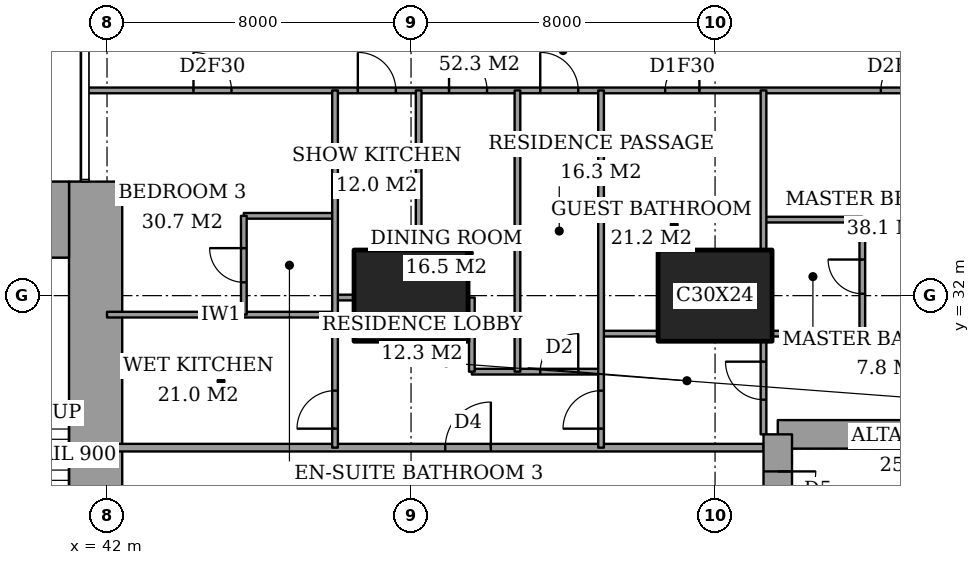
"""IFC4 building model, lengths in metres.
Left out: names, types, materials, properties, quantities, classifications, styles, units other than length and angle.
Written with IfcOpenShell. Run it as: python <this file> out.ifc"""

import sys

from ifc_helpers import new_model, si_unit, direction, frame, frame_2d, origin, origin_2d, place, context, subcontext, project, spatial, rectangle, extrude, element, fill, save


model = new_model("IFC4")
c1 = context("Model", 3, precision=1e-05, world=origin(), true_north=direction((0.0, 1.0)))
c2 = subcontext(c1, "Body", "Model", "MODEL_VIEW")
j1 = project(units=[si_unit("LENGTHUNIT", "METRE"), si_unit("PLANEANGLEUNIT", "RADIAN")], contexts=[c1])
p1 = place(None, origin())
s1 = spatial("IfcSite", under=j1, at=p1, CompositionType="ELEMENT")
p2 = place(p1, origin())
s2 = spatial("IfcBuilding", under=s1, at=p2, CompositionType="ELEMENT")
p3 = place(p2, frame((0.0, 0.0, 117.8)))
s3 = spatial("IfcBuildingStorey", under=s2, at=p3, CompositionType="ELEMENT", Elevation=117.8)
for number, where, z_axis, x_axis in (
    (1, (50.0, 32.0, 0.0), (0.0, 0.0, 1.0), (1.0, 0.0, 0.0)),
    (2, (58.0, 32.0, 0.0), (0.0, 0.0, 1.0), (1.0, 0.0, 0.0)),
):
    element("IfcColumn", number, at=place(p3, frame(where, z_axis=z_axis, x_axis=x_axis)), inside=s3, PredefinedType="COLUMN", context=c2, shape_type="SweptSolid", body=[
        extrude(rectangle(XDim=3.0, YDim=2.4, at=origin_2d()), origin(), (0.0, 0.0, 1.0), 3.6),
    ])
p4 = place(p3, frame((37.85, 34.0, 0.0), z_axis=(0.0, 0.0, 1.0), x_axis=(1.0, 0.0, 0.0)))
e3 = element("IfcWall", 3, at=p4, inside=s3, PredefinedType="SHEAR", context=c2, shape_type="SweptSolid", body=[
    extrude(rectangle(XDim=3.15, YDim=2.0, at=frame_2d((1.575, 0.0))), origin(), (0.0, 0.0, 1.0), 3.6),
])
p5 = place(p3, frame((41.7, 24.85, 0.0), z_axis=(0.0, 0.0, 1.0), x_axis=(0.0, 1.0, 0.0)))
e4 = element("IfcWall", 4, at=p5, inside=s3, PredefinedType="SHEAR", context=c2, shape_type="SweptSolid", body=[
    extrude(rectangle(XDim=10.15, YDim=1.4, at=frame_2d((5.075, 0.0))), origin(), (0.0, 0.0, 1.0), 3.6),
])
p6 = place(p3, frame((64.1, 28.35, 0.0), z_axis=(0.0, 0.0, 1.0), x_axis=(-1.0, 0.0, 0.0)))
e5 = element("IfcWall", 5, at=p6, inside=s3, PredefinedType="SHEAR", context=c2, shape_type="SweptSolid", body=[
    extrude(rectangle(XDim=4.45, YDim=0.75, at=frame_2d((2.225, 0.0))), origin(), (0.0, 0.0, 1.0), 3.6),
])
p7 = place(p3, frame((59.65, 28.35, 0.0), z_axis=(0.0, 0.0, 1.0), x_axis=(0.0, -1.0, 0.0)))
e6 = element("IfcWall", 6, at=p7, inside=s3, PredefinedType="SHEAR", context=c2, shape_type="SweptSolid", body=[
    extrude(rectangle(XDim=8.7, YDim=0.75, at=frame_2d((4.35, 0.0))), origin(), (0.0, 0.0, 1.0), 3.6),
])
p8 = place(p7, frame((0.975, 0.0, 0.0)))
e7 = element("IfcOpeningElement", 7, at=p8, cuts=e6, PredefinedType="OPENING", context=c2, shape_type="SweptSolid", body=[
    extrude(rectangle(XDim=1.0, YDim=2.1, at=frame_2d((0.5, 1.05))), frame((0.0, 0.385, 0.0), z_axis=(0.0, -1.0, 0.0), x_axis=(1.0, 0.0, 0.0)), (0.0, 0.0, 1.0), 0.77),
])
p9 = place(p3, frame((42.0, 28.0, 0.0), z_axis=(0.0, 0.0, 1.0), x_axis=(1.0, 0.0, 0.0)))
e8 = element("IfcWall", 8, at=p9, inside=s3, PredefinedType="PARTITIONING", context=c2, shape_type="SweptSolid", body=[
    extrude(rectangle(XDim=17.275, YDim=0.2, at=frame_2d((8.637, 0.0))), origin(), (0.0, 0.0, 1.0), 3.35),
])
p10 = place(p9, frame((8.9, 0.0, 0.0)))
e9 = element("IfcOpeningElement", 9, at=p10, cuts=e8, PredefinedType="OPENING", context=c2, shape_type="SweptSolid", body=[
    extrude(rectangle(XDim=1.2, YDim=2.4, at=frame_2d((0.6, 1.2))), frame((0.0, 0.11, 0.0), z_axis=(0.0, -1.0, 0.0), x_axis=(1.0, 0.0, 0.0)), (0.0, 0.0, 1.0), 0.22),
])
p11 = place(p3, frame((51.6, 30.0, 0.0), z_axis=(0.0, 0.0, 1.0), x_axis=(1.0, 0.0, 0.0)))
e10 = element("IfcWall", 10, at=p11, inside=s3, PredefinedType="PARTITIONING", context=c2, shape_type="SweptSolid", body=[
    extrude(rectangle(XDim=3.4, YDim=0.15, at=frame_2d((1.7, 0.0))), origin(), (0.0, 0.0, 1.0), 3.35),
])
p12 = place(p11, frame((1.8, 0.0, 0.0)))
e11 = element("IfcOpeningElement", 11, at=p12, cuts=e10, PredefinedType="OPENING", context=c2, shape_type="SweptSolid", body=[
    extrude(rectangle(XDim=1.0, YDim=2.1, at=frame_2d((0.5, 1.05))), frame((0.0, 0.085, 0.0), z_axis=(0.0, -1.0, 0.0), x_axis=(1.0, 0.0, 0.0)), (0.0, 0.0, 1.0), 0.17),
])
p13 = place(p3, frame((55.0, 31.0, 0.0), z_axis=(0.0, 0.0, 1.0), x_axis=(1.0, 0.0, 0.0)))
e12 = element("IfcWall", 12, at=p13, inside=s3, PredefinedType="PARTITIONING", context=c2, shape_type="SweptSolid", body=[
    extrude(rectangle(XDim=1.5, YDim=0.15, at=frame_2d((0.75, 0.0))), origin(), (0.0, 0.0, 1.0), 3.35),
])
p14 = place(p3, frame((59.5, 31.0, 0.0), z_axis=(0.0, 0.0, 1.0), x_axis=(1.0, 0.0, 0.0)))
e13 = element("IfcWall", 13, at=p14, inside=s3, PredefinedType="PARTITIONING", context=c2, shape_type="SweptSolid", body=[
    extrude(rectangle(XDim=5.15, YDim=0.15, at=frame_2d((2.575, 0.0))), origin(), (0.0, 0.0, 1.0), 3.35),
])
p15 = place(p3, frame((42.0, 31.5, 0.0), z_axis=(0.0, 0.0, 1.0), x_axis=(1.0, 0.0, 0.0)))
e14 = element("IfcWall", 14, at=p15, inside=s3, PredefinedType="PARTITIONING", context=c2, shape_type="SweptSolid", body=[
    extrude(rectangle(XDim=6.0, YDim=0.15, at=frame_2d((3.0, 0.0))), origin(), (0.0, 0.0, 1.0), 3.35),
])
p16 = place(p3, frame((48.0, 31.95, 0.0), z_axis=(0.0, 0.0, 1.0), x_axis=(1.0, 0.0, 0.0)))
e15 = element("IfcWall", 15, at=p16, inside=s3, PredefinedType="PARTITIONING", context=c2, shape_type="SweptSolid", body=[
    extrude(rectangle(XDim=0.5, YDim=0.15, at=frame_2d((0.25, 0.0))), origin(), (0.0, 0.0, 1.0), 2.634),
])
p17 = place(p3, frame((59.275, 34.0, 0.0), z_axis=(0.0, 0.0, 1.0), x_axis=(1.0, 0.0, 0.0)))
e16 = element("IfcWall", 16, at=p17, inside=s3, PredefinedType="PARTITIONING", context=c2, shape_type="SweptSolid", body=[
    extrude(rectangle(XDim=2.6, YDim=0.15, at=frame_2d((1.3, 0.0))), origin(), (0.0, 0.0, 1.0), 3.35),
])
p18 = place(p3, frame((45.6, 34.1, 0.0), z_axis=(0.0, 0.0, 1.0), x_axis=(1.0, 0.0, 0.0)))
e17 = element("IfcWall", 17, at=p18, inside=s3, PredefinedType="PARTITIONING", context=c2, shape_type="SweptSolid", body=[
    extrude(rectangle(XDim=2.4, YDim=0.15, at=frame_2d((1.2, 0.0))), origin(), (0.0, 0.0, 1.0), 3.35),
])
p19 = place(p3, frame((41.439, 37.4, 0.0), z_axis=(0.0, 0.0, 1.0), x_axis=(1.0, 0.0, 0.0)))
e18 = element("IfcWall", 18, at=p19, inside=s3, PredefinedType="PARTITIONING", context=c2, shape_type="SweptSolid", body=[
    extrude(rectangle(XDim=25.011, YDim=0.15, at=frame_2d((12.505, 0.0))), origin(), (0.0, 0.0, 1.0), 3.35),
])
p20 = place(p19, frame((11.961, 0.0, 0.0)))
e19 = element("IfcOpeningElement", 19, at=p20, cuts=e18, PredefinedType="OPENING", context=c2, shape_type="SweptSolid", body=[
    extrude(rectangle(XDim=1.0, YDim=2.1, at=frame_2d((0.5, 1.05))), frame((0.0, 0.085, 0.0), z_axis=(0.0, -1.0, 0.0), x_axis=(1.0, 0.0, 0.0)), (0.0, 0.0, 1.0), 0.17),
])
p21 = place(p19, frame((20.924, 0.0, 0.0)))
e20 = element("IfcOpeningElement", 20, at=p21, cuts=e18, PredefinedType="OPENING", context=c2, shape_type="SweptSolid", body=[
    extrude(rectangle(XDim=1.0, YDim=2.1, at=frame_2d((0.5, 1.05))), frame((0.0, 0.085, 0.0), z_axis=(0.0, -1.0, 0.0), x_axis=(1.0, 0.0, 0.0)), (0.0, 0.0, 1.0), 0.17),
])
p22 = place(p19, frame((15.249, 0.0, 0.0)))
e21 = element("IfcOpeningElement", 21, at=p22, cuts=e18, PredefinedType="OPENING", context=c2, shape_type="SweptSolid", body=[
    extrude(rectangle(XDim=0.9, YDim=2.1, at=frame_2d((0.45, 1.05))), frame((0.0, 0.085, 0.0), z_axis=(0.0, -1.0, 0.0), x_axis=(1.0, 0.0, 0.0)), (0.0, 0.0, 1.0), 0.17),
])
p23 = place(p19, frame((9.561, 0.0, 0.0)))
e22 = element("IfcOpeningElement", 22, at=p23, cuts=e18, PredefinedType="OPENING", context=c2, shape_type="SweptSolid", body=[
    extrude(rectangle(XDim=1.0, YDim=2.1, at=frame_2d((0.5, 1.05))), frame((0.0, 0.085, 0.0), z_axis=(0.0, -1.0, 0.0), x_axis=(1.0, 0.0, 0.0)), (0.0, 0.0, 1.0), 0.17),
])
p24 = place(p19, frame((7.161, 0.0, 0.0)))
e23 = element("IfcOpeningElement", 23, at=p24, cuts=e18, PredefinedType="OPENING", context=c2, shape_type="SweptSolid", body=[
    extrude(rectangle(XDim=1.0, YDim=2.1, at=frame_2d((0.5, 1.05))), frame((0.0, 0.085, 0.0), z_axis=(0.0, -1.0, 0.0), x_axis=(1.0, 0.0, 0.0)), (0.0, 0.0, 1.0), 0.17),
])
p25 = place(p19, frame((2.836, 0.0, 0.0)))
e24 = element("IfcOpeningElement", 24, at=p25, cuts=e18, PredefinedType="OPENING", context=c2, shape_type="SweptSolid", body=[
    extrude(rectangle(XDim=1.0, YDim=2.1, at=frame_2d((0.5, 1.05))), frame((0.0, 0.085, 0.0), z_axis=(0.0, -1.0, 0.0), x_axis=(1.0, 0.0, 0.0)), (0.0, 0.0, 1.0), 0.17),
])
p26 = place(p3, frame((45.6, 31.5, 0.0), z_axis=(0.0, 0.0, 1.0), x_axis=(0.0, 1.0, 0.0)))
e25 = element("IfcWall", 25, at=p26, inside=s3, PredefinedType="PARTITIONING", context=c2, shape_type="SweptSolid", body=[
    extrude(rectangle(XDim=2.6, YDim=0.15, at=frame_2d((1.3, 0.0))), origin(), (0.0, 0.0, 1.0), 3.35),
])
p27 = place(p26, frame((0.85, 0.0, 0.0)))
e26 = element("IfcOpeningElement", 26, at=p27, cuts=e25, PredefinedType="OPENING", context=c2, shape_type="SweptSolid", body=[
    extrude(rectangle(XDim=0.9, YDim=2.1, at=frame_2d((0.45, 1.05))), frame((0.0, 0.085, 0.0), z_axis=(0.0, -1.0, 0.0), x_axis=(1.0, 0.0, 0.0)), (0.0, 0.0, 1.0), 0.17),
])
p28 = place(p3, frame((48.0, 28.0, 0.0), z_axis=(0.0, 0.0, 1.0), x_axis=(0.0, 1.0, 0.0)))
e27 = element("IfcWall", 27, at=p28, inside=s3, PredefinedType="PARTITIONING", context=c2, shape_type="SweptSolid", body=[
    extrude(rectangle(XDim=9.4, YDim=0.15, at=frame_2d((4.7, 0.0))), origin(), (0.0, 0.0, 1.0), 3.35),
])
p29 = place(p28, frame((0.5, 0.0, 0.0)))
e28 = element("IfcOpeningElement", 28, at=p29, cuts=e27, PredefinedType="OPENING", context=c2, shape_type="SweptSolid", body=[
    extrude(rectangle(XDim=1.0, YDim=2.1, at=frame_2d((0.5, 1.05))), frame((0.0, 0.085, 0.0), z_axis=(0.0, -1.0, 0.0), x_axis=(1.0, 0.0, 0.0)), (0.0, 0.0, 1.0), 0.17),
])
p30 = place(p3, frame((50.2, 33.2, 0.0), z_axis=(0.0, 0.0, 1.0), x_axis=(0.0, 1.0, 0.0)))
e29 = element("IfcWall", 29, at=p30, inside=s3, PredefinedType="PARTITIONING", context=c2, shape_type="SweptSolid", body=[
    extrude(rectangle(XDim=4.2, YDim=0.15, at=frame_2d((2.1, 0.0))), origin(), (0.0, 0.0, 1.0), 3.35),
])
p31 = place(p3, frame((51.6, 30.0, 0.0), z_axis=(0.0, 0.0, 1.0), x_axis=(0.0, 1.0, 0.0)))
e30 = element("IfcWall", 30, at=p31, inside=s3, PredefinedType="PARTITIONING", context=c2, shape_type="SweptSolid", body=[
    extrude(rectangle(XDim=1.95, YDim=0.15, at=frame_2d((0.975, 0.0))), origin(), (0.0, 0.0, 1.0), 3.35),
])
p32 = place(p3, frame((52.8, 30.0, 0.0), z_axis=(0.0, 0.0, 1.0), x_axis=(0.0, 1.0, 0.0)))
e31 = element("IfcWall", 31, at=p32, inside=s3, PredefinedType="PARTITIONING", context=c2, shape_type="SweptSolid", body=[
    extrude(rectangle(XDim=7.4, YDim=0.15, at=frame_2d((3.7, 0.0))), origin(), (0.0, 0.0, 1.0), 3.35),
])
p33 = place(p3, frame((55.0, 28.0, 0.0), z_axis=(0.0, 0.0, 1.0), x_axis=(0.0, 1.0, 0.0)))
e32 = element("IfcWall", 32, at=p33, inside=s3, PredefinedType="PARTITIONING", context=c2, shape_type="SweptSolid", body=[
    extrude(rectangle(XDim=9.4, YDim=0.15, at=frame_2d((4.7, 0.0))), origin(), (0.0, 0.0, 1.0), 3.35),
])
p34 = place(p33, frame((0.5, 0.0, 0.0)))
e33 = element("IfcOpeningElement", 33, at=p34, cuts=e32, PredefinedType="OPENING", context=c2, shape_type="SweptSolid", body=[
    extrude(rectangle(XDim=1.0, YDim=2.1, at=frame_2d((0.5, 1.05))), frame((0.0, 0.085, 0.0), z_axis=(0.0, -1.0, 0.0), x_axis=(1.0, 0.0, 0.0)), (0.0, 0.0, 1.0), 0.17),
])
p35 = place(p3, frame((59.275, 28.35, 0.0), z_axis=(0.0, 0.0, 1.0), x_axis=(0.0, 1.0, 0.0)))
e34 = element("IfcWall", 34, at=p35, inside=s3, PredefinedType="PARTITIONING", context=c2, shape_type="SweptSolid", body=[
    extrude(rectangle(XDim=2.45, YDim=0.15, at=frame_2d((1.225, 0.0))), origin(), (0.0, 0.0, 1.0), 3.35),
])
p36 = place(p35, frame((0.913, 0.0, 0.0)))
e35 = element("IfcOpeningElement", 35, at=p36, cuts=e34, PredefinedType="OPENING", context=c2, shape_type="SweptSolid", body=[
    extrude(rectangle(XDim=1.0, YDim=2.1, at=frame_2d((0.5, 1.05))), frame((0.0, 0.085, 0.0), z_axis=(0.0, -1.0, 0.0), x_axis=(1.0, 0.0, 0.0)), (0.0, 0.0, 1.0), 0.17),
])
p37 = place(p3, frame((59.275, 33.2, 0.0), z_axis=(0.0, 0.0, 1.0), x_axis=(0.0, 1.0, 0.0)))
e36 = element("IfcWall", 36, at=p37, inside=s3, PredefinedType="PARTITIONING", context=c2, shape_type="SweptSolid", body=[
    extrude(rectangle(XDim=4.2, YDim=0.15, at=frame_2d((2.1, 0.0))), origin(), (0.0, 0.0, 1.0), 3.35),
])
p38 = place(p3, frame((61.875, 31.0, 0.0), z_axis=(0.0, 0.0, 1.0), x_axis=(0.0, 1.0, 0.0)))
e37 = element("IfcWall", 37, at=p38, inside=s3, PredefinedType="PARTITIONING", context=c2, shape_type="SweptSolid", body=[
    extrude(rectangle(XDim=3.0, YDim=0.15, at=frame_2d((1.5, 0.0))), origin(), (0.0, 0.0, 1.0), 3.35),
])
p39 = place(p38, frame((1.05, 0.0, 0.0)))
e38 = element("IfcOpeningElement", 38, at=p39, cuts=e37, PredefinedType="OPENING", context=c2, shape_type="SweptSolid", body=[
    extrude(rectangle(XDim=0.9, YDim=2.1, at=frame_2d((0.45, 1.05))), frame((0.0, 0.085, 0.0), z_axis=(0.0, -1.0, 0.0), x_axis=(1.0, 0.0, 0.0)), (0.0, 0.0, 1.0), 0.17),
])
p40 = place(p20, origin())
e39 = element("IfcDoor", 39, at=p40, inside=s3, OperationType="SINGLE_SWING_RIGHT", PredefinedType="DOOR", context=c2, shape_type="SweptSolid", body=[
    extrude(rectangle(XDim=1.0, YDim=2.1, at=frame_2d((0.5, 1.05))), frame((0.0, 0.025, 0.0), z_axis=(0.0, -1.0, 0.0), x_axis=(1.0, 0.0, 0.0)), (0.0, 0.0, 1.0), 0.05),
])
fill(e19, e39)
p41 = place(p39, origin())
e40 = element("IfcDoor", 40, at=p41, inside=s3, OperationType="SINGLE_SWING_LEFT", PredefinedType="DOOR", context=c2, shape_type="SweptSolid", body=[
    extrude(rectangle(XDim=0.9, YDim=2.1, at=frame_2d((0.45, 1.05))), frame((0.0, 0.025, 0.0), z_axis=(0.0, -1.0, 0.0), x_axis=(1.0, 0.0, 0.0)), (0.0, 0.0, 1.0), 0.05),
])
fill(e38, e40)
p42 = place(p21, origin())
e41 = element("IfcDoor", 41, at=p42, inside=s3, OperationType="SINGLE_SWING_LEFT", PredefinedType="DOOR", context=c2, shape_type="SweptSolid", body=[
    extrude(rectangle(XDim=1.0, YDim=2.1, at=frame_2d((0.5, 1.05))), frame((0.0, 0.025, 0.0), z_axis=(0.0, -1.0, 0.0), x_axis=(1.0, 0.0, 0.0)), (0.0, 0.0, 1.0), 0.05),
])
fill(e20, e41)
p43 = place(p36, origin())
e42 = element("IfcDoor", 42, at=p43, inside=s3, OperationType="SINGLE_SWING_LEFT", PredefinedType="DOOR", context=c2, shape_type="SweptSolid", body=[
    extrude(rectangle(XDim=1.0, YDim=2.1, at=frame_2d((0.5, 1.05))), frame((0.0, 0.025, 0.0), z_axis=(0.0, -1.0, 0.0), x_axis=(1.0, 0.0, 0.0)), (0.0, 0.0, 1.0), 0.05),
])
fill(e35, e42)
p44 = place(p22, origin())
e43 = element("IfcDoor", 43, at=p44, inside=s3, OperationType="SINGLE_SWING_LEFT", PredefinedType="DOOR", context=c2, shape_type="SweptSolid", body=[
    extrude(rectangle(XDim=0.9, YDim=2.1, at=frame_2d((0.45, 1.05))), frame((0.0, 0.025, 0.0), z_axis=(0.0, -1.0, 0.0), x_axis=(1.0, 0.0, 0.0)), (0.0, 0.0, 1.0), 0.05),
])
fill(e21, e43)
p45 = place(p34, origin())
e44 = element("IfcDoor", 44, at=p45, inside=s3, OperationType="SINGLE_SWING_RIGHT", PredefinedType="DOOR", context=c2, shape_type="SweptSolid", body=[
    extrude(rectangle(XDim=1.0, YDim=2.1, at=frame_2d((0.5, 1.05))), frame((0.0, 0.025, 0.0), z_axis=(0.0, -1.0, 0.0), x_axis=(1.0, 0.0, 0.0)), (0.0, 0.0, 1.0), 0.05),
])
fill(e33, e44)
p46 = place(p10, origin())
e45 = element("IfcDoor", 45, at=p46, inside=s3, OperationType="SINGLE_SWING_LEFT", PredefinedType="DOOR", context=c2, shape_type="SweptSolid", body=[
    extrude(rectangle(XDim=1.2, YDim=2.4, at=frame_2d((0.6, 1.2))), frame((0.0, 0.025, 0.0), z_axis=(0.0, -1.0, 0.0), x_axis=(1.0, 0.0, 0.0)), (0.0, 0.0, 1.0), 0.05),
])
fill(e9, e45)
p47 = place(p12, origin())
e46 = element("IfcDoor", 46, at=p47, inside=s3, OperationType="SINGLE_SWING_LEFT", PredefinedType="DOOR", context=c2, shape_type="SweptSolid", body=[
    extrude(rectangle(XDim=1.0, YDim=2.1, at=frame_2d((0.5, 1.05))), frame((0.0, 0.025, 0.0), z_axis=(0.0, -1.0, 0.0), x_axis=(1.0, 0.0, 0.0)), (0.0, 0.0, 1.0), 0.05),
])
fill(e11, e46)
p48 = place(p23, origin())
e47 = element("IfcDoor", 47, at=p48, inside=s3, OperationType="SINGLE_SWING_RIGHT", PredefinedType="DOOR", context=c2, shape_type="SweptSolid", body=[
    extrude(rectangle(XDim=1.0, YDim=2.1, at=frame_2d((0.5, 1.05))), frame((0.0, 0.025, 0.0), z_axis=(0.0, -1.0, 0.0), x_axis=(1.0, 0.0, 0.0)), (0.0, 0.0, 1.0), 0.05),
])
fill(e22, e47)
p49 = place(p24, origin())
e48 = element("IfcDoor", 48, at=p49, inside=s3, OperationType="SINGLE_SWING_RIGHT", PredefinedType="DOOR", context=c2, shape_type="SweptSolid", body=[
    extrude(rectangle(XDim=1.0, YDim=2.1, at=frame_2d((0.5, 1.05))), frame((0.0, 0.025, 0.0), z_axis=(0.0, -1.0, 0.0), x_axis=(1.0, 0.0, 0.0)), (0.0, 0.0, 1.0), 0.05),
])
fill(e23, e48)
p50 = place(p27, origin())
e49 = element("IfcDoor", 49, at=p50, inside=s3, OperationType="SINGLE_SWING_LEFT", PredefinedType="DOOR", context=c2, shape_type="SweptSolid", body=[
    extrude(rectangle(XDim=0.9, YDim=2.1, at=frame_2d((0.45, 1.05))), frame((0.0, 0.025, 0.0), z_axis=(0.0, -1.0, 0.0), x_axis=(1.0, 0.0, 0.0)), (0.0, 0.0, 1.0), 0.05),
])
fill(e26, e49)
p51 = place(p25, origin())
e50 = element("IfcDoor", 50, at=p51, inside=s3, OperationType="SINGLE_SWING_RIGHT", PredefinedType="DOOR", context=c2, shape_type="SweptSolid", body=[
    extrude(rectangle(XDim=1.0, YDim=2.1, at=frame_2d((0.5, 1.05))), frame((0.0, 0.025, 0.0), z_axis=(0.0, -1.0, 0.0), x_axis=(1.0, 0.0, 0.0)), (0.0, 0.0, 1.0), 0.05),
])
fill(e24, e50)
p52 = place(p29, origin())
e51 = element("IfcDoor", 51, at=p52, inside=s3, OperationType="SINGLE_SWING_RIGHT", PredefinedType="DOOR", context=c2, shape_type="SweptSolid", body=[
    extrude(rectangle(XDim=1.0, YDim=2.1, at=frame_2d((0.5, 1.05))), frame((0.0, 0.025, 0.0), z_axis=(0.0, -1.0, 0.0), x_axis=(1.0, 0.0, 0.0)), (0.0, 0.0, 1.0), 0.05),
])
fill(e28, e51)
p53 = place(p8, origin())
e52 = element("IfcDoor", 52, at=p53, inside=s3, OperationType="SINGLE_SWING_RIGHT", PredefinedType="DOOR", context=c2, shape_type="SweptSolid", body=[
    extrude(rectangle(XDim=1.0, YDim=2.1, at=frame_2d((0.5, 1.05))), frame((0.0, 0.025, 0.0), z_axis=(0.0, -1.0, 0.0), x_axis=(1.0, 0.0, 0.0)), (0.0, 0.0, 1.0), 0.05),
])
fill(e7, e52)
save(model, sys.argv[1])
